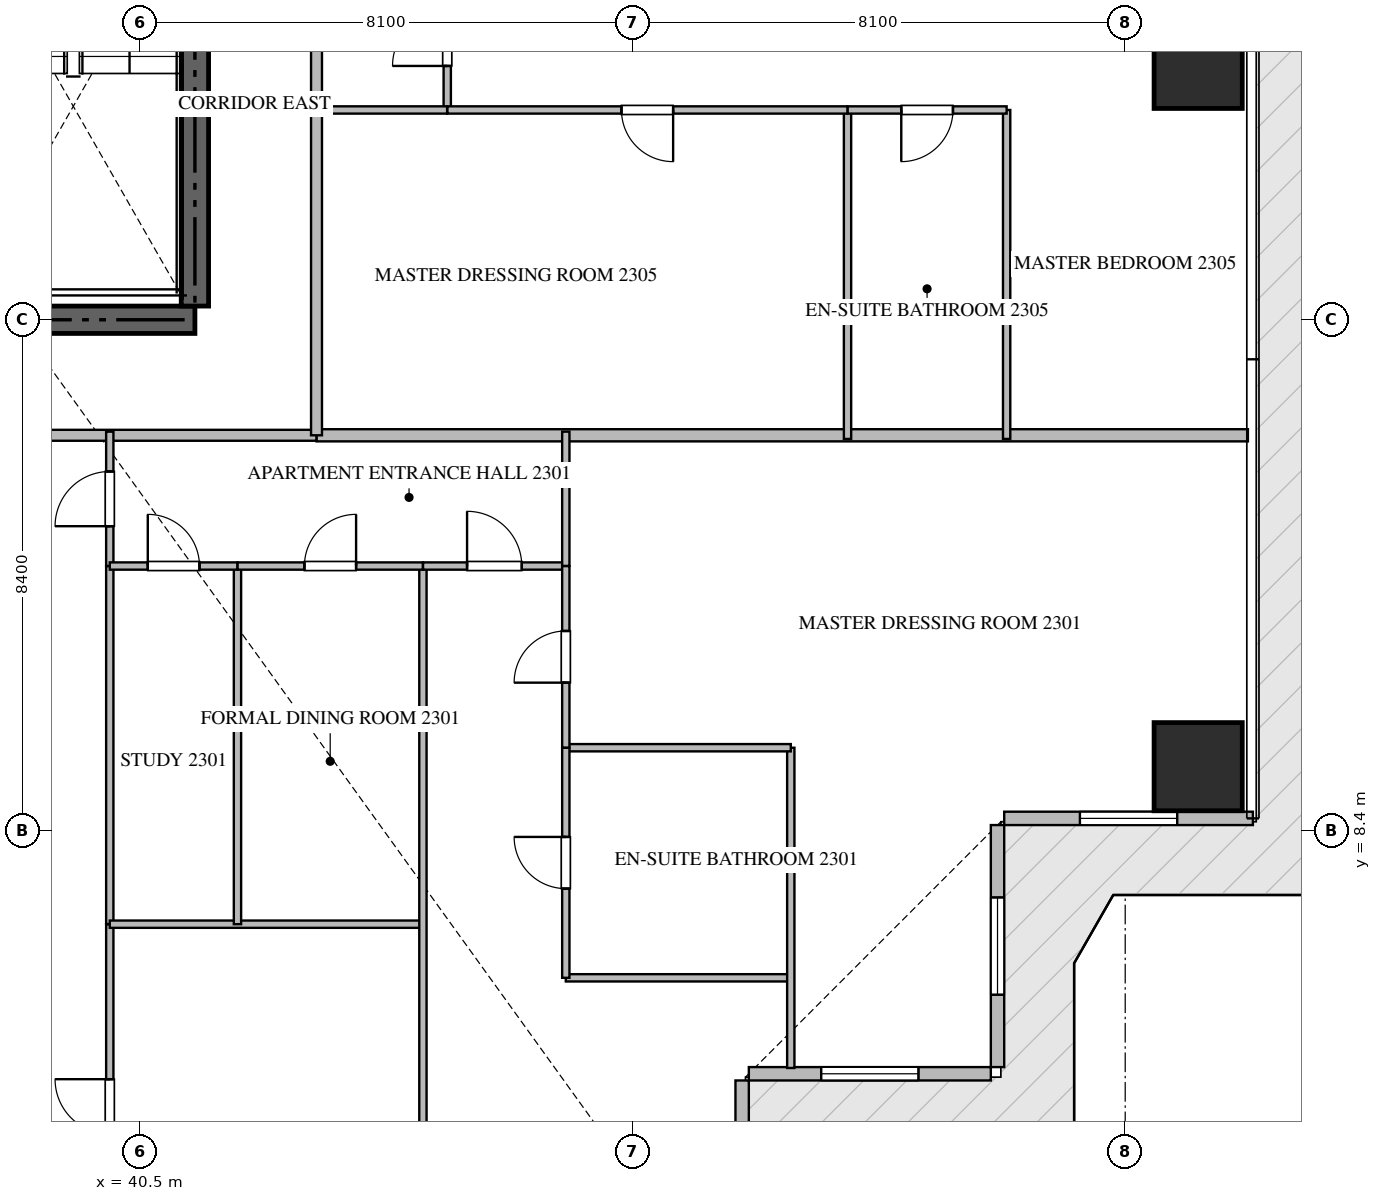
"""IFC4 building model, lengths in metres.
Left out: names, types, materials, properties, quantities, classifications, styles, units other than length and angle.
Written with IfcOpenShell. Run it as: python <this file> out.ifc"""

import sys

from ifc_helpers import new_model, si_unit, direction, frame, frame_2d, origin, origin_2d, place, context, subcontext, project, spatial, rectangle, extrude, source, transform, mapped, element, fill, save


model = new_model("IFC4")
c1 = context("Model", 3, precision=1e-05, world=origin(), true_north=direction((0.0, 1.0)))
c2 = subcontext(c1, "Body", "Model", "MODEL_VIEW")
j1 = project(units=[si_unit("LENGTHUNIT", "METRE"), si_unit("PLANEANGLEUNIT", "RADIAN")], contexts=[c1])
p1 = place(None, origin())
s1 = spatial("IfcSite", under=j1, at=p1, CompositionType="ELEMENT")
p2 = place(p1, origin())
s2 = spatial("IfcBuilding", under=s1, at=p2, CompositionType="ELEMENT")
p3 = place(p2, frame((0.0, 0.0, 94.2)))
s3 = spatial("IfcBuildingStorey", under=s2, at=p3, CompositionType="ELEMENT", Elevation=94.2)
p4 = place(p3, frame((23.4, 16.8, -0.26), z_axis=(0.0, 0.0, 1.0), x_axis=(1.0, 0.0, 0.0)))
e1 = element("IfcWall", 1, at=p4, inside=s3, PredefinedType="SHEAR", context=c2, shape_type="SweptSolid", body=[
    extrude(rectangle(XDim=18.0, YDim=0.45, at=frame_2d((9.0, 0.0))), origin(), (0.0, 0.0, 1.0), 3.748),
])
p5 = place(p3, frame((41.4, 17.025, -0.26), z_axis=(0.0, 0.0, 1.0), x_axis=(0.0, 1.0, 0.0)))
e2 = element("IfcWall", 2, at=p5, inside=s3, PredefinedType="SHEAR", context=c2, shape_type="SweptSolid", body=[
    extrude(rectangle(XDim=8.325, YDim=0.45, at=frame_2d((4.163, 0.0))), origin(), (0.0, 0.0, 1.0), 3.748),
])
m1 = source(origin(), c2, "Body", "SweptSolid", [
    extrude(rectangle(XDim=1.45, YDim=1.45, at=origin_2d()), origin(), (0.0, 0.0, 1.0), 3.75),
])
for number, where, z_axis, x_axis in (
    (3, (57.9, 9.45, -0.26), (0.0, 0.0, 1.0), (1.0, 0.0, 0.0)),
    (4, (57.9, 21.0, -0.26), (0.0, 0.0, 1.0), (1.0, 0.0, 0.0)),
):
    element("IfcColumn", number, at=place(p3, frame(where, z_axis=z_axis, x_axis=x_axis)), inside=s3, PredefinedType="COLUMN", context=c2, shape_type="MappedRepresentation", body=[
        mapped(m1, transform((0.0, 0.0, 0.0), scale=1.0)),
    ])
p6 = place(p3, frame((50.4, 0.2, 0.0), z_axis=(0.0, 0.0, 1.0), x_axis=(0.0, 1.0, 0.0)))
e5 = element("IfcWall", 5, at=p6, inside=s3, PredefinedType="ELEMENTEDWALL", context=c2, shape_type="SweptSolid", body=[
    extrude(rectangle(XDim=4.09, YDim=0.22, at=frame_2d((2.045, 0.0))), origin(), (0.0, 0.0, 1.0), 3.475),
])
p7 = place(p6, frame((1.245, 0.0, 0.65)))
e6 = element("IfcOpeningElement", 6, at=p7, cuts=e5, PredefinedType="OPENING", context=c2, shape_type="SweptSolid", body=[
    extrude(rectangle(XDim=1.6, YDim=2.1, at=frame_2d((0.8, 1.05))), frame((0.0, 0.12, 0.0), z_axis=(0.0, -1.0, 0.0), x_axis=(1.0, 0.0, 0.0)), (0.0, 0.0, 1.0), 0.24),
])
p8 = place(p3, frame((50.51, 4.4, 0.0), z_axis=(0.0, 0.0, 1.0), x_axis=(1.0, 0.0, 0.0)))
e7 = element("IfcWall", 7, at=p8, inside=s3, PredefinedType="ELEMENTEDWALL", context=c2, shape_type="SweptSolid", body=[
    extrude(rectangle(XDim=3.98, YDim=0.22, at=frame_2d((1.99, 0.0))), origin(), (0.0, 0.0, 1.0), 3.475),
])
p9 = place(p8, frame((1.19, 0.0, 0.65)))
e8 = element("IfcOpeningElement", 8, at=p9, cuts=e7, PredefinedType="OPENING", context=c2, shape_type="SweptSolid", body=[
    extrude(rectangle(XDim=1.6, YDim=2.1, at=frame_2d((0.8, 1.05))), frame((0.0, 0.12, 0.0), z_axis=(0.0, -1.0, 0.0), x_axis=(1.0, 0.0, 0.0)), (0.0, 0.0, 1.0), 0.24),
])
p10 = place(p3, frame((54.6, 4.51, 0.0), z_axis=(0.0, 0.0, 1.0), x_axis=(0.0, 1.0, 0.0)))
e9 = element("IfcWall", 9, at=p10, inside=s3, PredefinedType="ELEMENTEDWALL", context=c2, shape_type="SweptSolid", body=[
    extrude(rectangle(XDim=3.98, YDim=0.22, at=frame_2d((1.99, 0.0))), origin(), (0.0, 0.0, 1.0), 3.475),
])
p11 = place(p10, frame((1.19, 0.0, 0.65)))
e10 = element("IfcOpeningElement", 10, at=p11, cuts=e9, PredefinedType="OPENING", context=c2, shape_type="SweptSolid", body=[
    extrude(rectangle(XDim=1.6, YDim=2.1, at=frame_2d((0.8, 1.05))), frame((0.0, 0.12, 0.0), z_axis=(0.0, -1.0, 0.0), x_axis=(1.0, 0.0, 0.0)), (0.0, 0.0, 1.0), 0.24),
])
p12 = place(p3, frame((54.71, 8.6, 0.0), z_axis=(0.0, 0.0, 1.0), x_axis=(1.0, 0.0, 0.0)))
e11 = element("IfcWall", 11, at=p12, inside=s3, PredefinedType="ELEMENTEDWALL", context=c2, shape_type="SweptSolid", body=[
    extrude(rectangle(XDim=4.09, YDim=0.22, at=frame_2d((2.045, 0.0))), origin(), (0.0, 0.0, 1.0), 3.475),
])
p13 = place(p12, frame((1.245, 0.0, 0.65)))
e12 = element("IfcOpeningElement", 12, at=p13, cuts=e11, PredefinedType="OPENING", context=c2, shape_type="SweptSolid", body=[
    extrude(rectangle(XDim=1.6, YDim=2.1, at=frame_2d((0.8, 1.05))), frame((0.0, 0.12, 0.0), z_axis=(0.0, -1.0, 0.0), x_axis=(1.0, 0.0, 0.0)), (0.0, 0.0, 1.0), 0.24),
])
p14 = place(p3, frame((43.4, 14.9, 0.0), z_axis=(0.0, 0.0, 1.0), x_axis=(1.0, 0.0, 0.0)))
e13 = element("IfcWall", 13, at=p14, inside=s3, PredefinedType="PARTITIONING", context=c2, shape_type="SweptSolid", body=[
    extrude(rectangle(XDim=15.318, YDim=0.2, at=frame_2d((7.659, 0.0))), origin(), (0.0, 0.0, 1.0), 3.49),
])
p15 = place(p3, frame((21.402, 14.9, 0.0), z_axis=(0.0, 0.0, 1.0), x_axis=(1.0, 0.0, 0.0)))
e14 = element("IfcWall", 14, at=p15, inside=s3, PredefinedType="PARTITIONING", context=c2, shape_type="SweptSolid", body=[
    extrude(rectangle(XDim=21.996, YDim=0.18, at=frame_2d((10.998, 0.0))), origin(), (0.0, 0.0, 1.0), 3.49),
])
p16 = place(p15, frame((15.222, 0.0, 0.0)))
e15 = element("IfcOpeningElement", 15, at=p16, cuts=e14, PredefinedType="OPENING", context=c2, shape_type="SweptSolid", body=[
    extrude(rectangle(XDim=1.0, YDim=2.15, at=frame_2d((0.5, 1.075))), frame((0.0, 0.1, 0.0), z_axis=(0.0, -1.0, 0.0), x_axis=(1.0, 0.0, 0.0)), (0.0, 0.0, 1.0), 0.2),
])
p17 = place(p3, frame((43.4, 14.9, 0.0), z_axis=(0.0, 0.0, 1.0), x_axis=(0.0, 1.0, 0.0)))
e16 = element("IfcWall", 16, at=p17, inside=s3, PredefinedType="PARTITIONING", context=c2, shape_type="SweptSolid", body=[
    extrude(rectangle(XDim=20.6, YDim=0.18, at=frame_2d((10.3, 0.0))), origin(), (0.0, 0.0, 1.0), 3.49),
])
p18 = place(p17, frame((17.64, 0.0, 0.0)))
e17 = element("IfcOpeningElement", 17, at=p18, cuts=e16, PredefinedType="OPENING", context=c2, shape_type="SweptSolid", body=[
    extrude(rectangle(XDim=1.0, YDim=2.15, at=frame_2d((0.5, 1.075))), frame((0.0, 0.1, 0.0), z_axis=(0.0, -1.0, 0.0), x_axis=(1.0, 0.0, 0.0)), (0.0, 0.0, 1.0), 0.2),
])
p19 = place(p3, frame((40.0, 12.75, 0.0), z_axis=(0.0, 0.0, 1.0), x_axis=(0.0, 1.0, 0.0)))
e18 = element("IfcWall", 18, at=p19, inside=s3, PredefinedType="PARTITIONING", context=c2, shape_type="SweptSolid", body=[
    extrude(rectangle(XDim=2.21, YDim=0.12, at=frame_2d((1.105, 0.0))), origin(), (0.0, 0.0, 1.0), 3.49),
])
p20 = place(p19, frame((0.655, 0.0, 0.0)))
e19 = element("IfcOpeningElement", 19, at=p20, cuts=e18, PredefinedType="OPENING", context=c2, shape_type="SweptSolid", body=[
    extrude(rectangle(XDim=0.9, YDim=2.1, at=frame_2d((0.45, 1.05))), frame((0.0, 0.07, 0.0), z_axis=(0.0, -1.0, 0.0), x_axis=(1.0, 0.0, 0.0)), (0.0, 0.0, 1.0), 0.14),
])
p21 = place(p3, frame((40.0, 0.295, 0.0), z_axis=(0.0, 0.0, 1.0), x_axis=(0.0, 1.0, 0.0)))
e20 = element("IfcWall", 20, at=p21, inside=s3, PredefinedType="PARTITIONING", context=c2, shape_type="SweptSolid", body=[
    extrude(rectangle(XDim=6.565, YDim=0.12, at=frame_2d((3.283, 0.0))), origin(), (0.0, 0.0, 1.0), 3.49),
])
p22 = place(p21, frame((3.116, 0.0, 0.0)))
e21 = element("IfcOpeningElement", 21, at=p22, cuts=e20, PredefinedType="OPENING", context=c2, shape_type="SweptSolid", body=[
    extrude(rectangle(XDim=0.9, YDim=2.1, at=frame_2d((0.45, 1.05))), frame((0.0, 0.07, 0.0), z_axis=(0.0, -1.0, 0.0), x_axis=(1.0, 0.0, 0.0)), (0.0, 0.0, 1.0), 0.14),
])
p23 = place(p3, frame((40.0, 6.862, 0.0), z_axis=(0.0, 0.0, 1.0), x_axis=(0.0, 1.0, 0.0)))
e22 = element("IfcWall", 22, at=p23, inside=s3, PredefinedType="PARTITIONING", context=c2, shape_type="SweptSolid", body=[
    extrude(rectangle(XDim=5.886, YDim=0.12, at=frame_2d((2.943, 0.0))), origin(), (0.0, 0.0, 1.0), 3.49),
])
p24 = place(p3, frame((40.0, 6.86, 0.0), z_axis=(0.0, 0.0, 1.0), x_axis=(1.0, 0.0, 0.0)))
e23 = element("IfcWall", 23, at=p24, inside=s3, PredefinedType="PARTITIONING", context=c2, shape_type="SweptSolid", body=[
    extrude(rectangle(XDim=5.15, YDim=0.12, at=frame_2d((2.575, 0.0))), origin(), (0.0, 0.0, 1.0), 3.49),
])
p25 = place(p3, frame((45.15, 0.295, 0.0), z_axis=(0.0, 0.0, 1.0), x_axis=(0.0, 1.0, 0.0)))
e24 = element("IfcWall", 24, at=p25, inside=s3, PredefinedType="PARTITIONING", context=c2, shape_type="SweptSolid", body=[
    extrude(rectangle(XDim=12.455, YDim=0.12, at=frame_2d((6.228, 0.0))), origin(), (0.0, 0.0, 1.0), 3.49),
])
p26 = place(p3, frame((42.1, 6.86, 0.0), z_axis=(0.0, 0.0, 1.0), x_axis=(0.0, 1.0, 0.0)))
e25 = element("IfcWall", 25, at=p26, inside=s3, PredefinedType="PARTITIONING", context=c2, shape_type="SweptSolid", body=[
    extrude(rectangle(XDim=5.89, YDim=0.12, at=frame_2d((2.945, 0.0))), origin(), (0.0, 0.0, 1.0), 3.49),
])
p27 = place(p3, frame((40.0, 12.75, 0.0), z_axis=(0.0, 0.0, 1.0), x_axis=(1.0, 0.0, 0.0)))
e26 = element("IfcWall", 26, at=p27, inside=s3, PredefinedType="PARTITIONING", context=c2, shape_type="SweptSolid", body=[
    extrude(rectangle(XDim=2.1, YDim=0.12, at=frame_2d((1.05, 0.0))), origin(), (0.0, 0.0, 1.0), 3.49),
])
p28 = place(p27, frame((0.625, 0.0, 0.0)))
e27 = element("IfcOpeningElement", 27, at=p28, cuts=e26, PredefinedType="OPENING", context=c2, shape_type="SweptSolid", body=[
    extrude(rectangle(XDim=0.85, YDim=2.1, at=frame_2d((0.425, 1.05))), frame((0.0, 0.07, 0.0), z_axis=(0.0, -1.0, 0.0), x_axis=(1.0, 0.0, 0.0)), (0.0, 0.0, 1.0), 0.14),
])
p29 = place(p3, frame((42.102, 12.75, 0.0), z_axis=(0.0, 0.0, 1.0), x_axis=(1.0, 0.0, 0.0)))
e28 = element("IfcWall", 28, at=p29, inside=s3, PredefinedType="PARTITIONING", context=c2, shape_type="SweptSolid", body=[
    extrude(rectangle(XDim=3.048, YDim=0.12, at=frame_2d((1.524, 0.0))), origin(), (0.0, 0.0, 1.0), 3.49),
])
p30 = place(p29, frame((1.099, 0.0, 0.0)))
e29 = element("IfcOpeningElement", 29, at=p30, cuts=e28, PredefinedType="OPENING", context=c2, shape_type="SweptSolid", body=[
    extrude(rectangle(XDim=0.85, YDim=2.1, at=frame_2d((0.425, 1.05))), frame((0.0, 0.07, 0.0), z_axis=(0.0, -1.0, 0.0), x_axis=(1.0, 0.0, 0.0)), (0.0, 0.0, 1.0), 0.14),
])
p31 = place(p3, frame((45.152, 12.75, 0.0), z_axis=(0.0, 0.0, 1.0), x_axis=(1.0, 0.0, 0.0)))
e30 = element("IfcWall", 30, at=p31, inside=s3, PredefinedType="PARTITIONING", context=c2, shape_type="SweptSolid", body=[
    extrude(rectangle(XDim=2.348, YDim=0.12, at=frame_2d((1.174, 0.0))), origin(), (0.0, 0.0, 1.0), 3.49),
])
p32 = place(p31, frame((0.724, 0.0, 0.0)))
e31 = element("IfcOpeningElement", 31, at=p32, cuts=e30, PredefinedType="OPENING", context=c2, shape_type="SweptSolid", body=[
    extrude(rectangle(XDim=0.9, YDim=2.1, at=frame_2d((0.45, 1.05))), frame((0.0, 0.07, 0.0), z_axis=(0.0, -1.0, 0.0), x_axis=(1.0, 0.0, 0.0)), (0.0, 0.0, 1.0), 0.14),
])
p33 = place(p3, frame((47.5, 5.978, 0.0), z_axis=(0.0, 0.0, 1.0), x_axis=(1.0, 0.0, 0.0)))
e32 = element("IfcWall", 32, at=p33, inside=s3, PredefinedType="PARTITIONING", context=c2, shape_type="SweptSolid", body=[
    extrude(rectangle(XDim=3.7, YDim=0.12, at=frame_2d((1.85, 0.0))), origin(), (0.0, 0.0, 1.0), 3.49),
])
p34 = place(p3, frame((51.2, 4.495, 0.0), z_axis=(0.0, 0.0, 1.0), x_axis=(0.0, 1.0, 0.0)))
e33 = element("IfcWall", 33, at=p34, inside=s3, PredefinedType="PARTITIONING", context=c2, shape_type="SweptSolid", body=[
    extrude(rectangle(XDim=5.267, YDim=0.12, at=frame_2d((2.633, 0.0))), origin(), (0.0, 0.0, 1.0), 3.49),
])
p35 = place(p3, frame((47.5, 9.762, 0.0), z_axis=(0.0, 0.0, 1.0), x_axis=(1.0, 0.0, 0.0)))
e34 = element("IfcWall", 34, at=p35, inside=s3, PredefinedType="PARTITIONING", context=c2, shape_type="SweptSolid", body=[
    extrude(rectangle(XDim=3.7, YDim=0.12, at=frame_2d((1.85, 0.0))), origin(), (0.0, 0.0, 1.0), 3.49),
])
p36 = place(p3, frame((47.5, 5.978, 0.0), z_axis=(0.0, 0.0, 1.0), x_axis=(0.0, 1.0, 0.0)))
e35 = element("IfcWall", 35, at=p36, inside=s3, PredefinedType="PARTITIONING", context=c2, shape_type="SweptSolid", body=[
    extrude(rectangle(XDim=3.784, YDim=0.12, at=frame_2d((1.892, 0.0))), origin(), (0.0, 0.0, 1.0), 3.49),
])
p37 = place(p36, frame((1.467, 0.0, 0.0)))
e36 = element("IfcOpeningElement", 36, at=p37, cuts=e35, PredefinedType="OPENING", context=c2, shape_type="SweptSolid", body=[
    extrude(rectangle(XDim=0.85, YDim=2.1, at=frame_2d((0.425, 1.05))), frame((0.0, 0.07, 0.0), z_axis=(0.0, -1.0, 0.0), x_axis=(1.0, 0.0, 0.0)), (0.0, 0.0, 1.0), 0.14),
])
p38 = place(p3, frame((47.5, 9.764, 0.0), z_axis=(0.0, 0.0, 1.0), x_axis=(0.0, 1.0, 0.0)))
e37 = element("IfcWall", 37, at=p38, inside=s3, PredefinedType="PARTITIONING", context=c2, shape_type="SweptSolid", body=[
    extrude(rectangle(XDim=2.986, YDim=0.12, at=frame_2d((1.493, 0.0))), origin(), (0.0, 0.0, 1.0), 3.49),
])
p39 = place(p38, frame((1.068, 0.0, 0.0)))
e38 = element("IfcOpeningElement", 38, at=p39, cuts=e37, PredefinedType="OPENING", context=c2, shape_type="SweptSolid", body=[
    extrude(rectangle(XDim=0.85, YDim=2.1, at=frame_2d((0.425, 1.05))), frame((0.0, 0.07, 0.0), z_axis=(0.0, -1.0, 0.0), x_axis=(1.0, 0.0, 0.0)), (0.0, 0.0, 1.0), 0.14),
])
p40 = place(p3, frame((47.5, 12.752, 0.0), z_axis=(0.0, 0.0, 1.0), x_axis=(0.0, 1.0, 0.0)))
e39 = element("IfcWall", 39, at=p40, inside=s3, PredefinedType="PARTITIONING", context=c2, shape_type="SweptSolid", body=[
    extrude(rectangle(XDim=2.208, YDim=0.12, at=frame_2d((1.104, 0.0))), origin(), (0.0, 0.0, 1.0), 3.49),
])
p41 = place(p3, frame((45.55, 20.25, 0.0), z_axis=(0.0, 0.0, 1.0), x_axis=(0.0, 1.0, 0.0)))
e40 = element("IfcWall", 40, at=p41, inside=s3, PredefinedType="PARTITIONING", context=c2, shape_type="SweptSolid", body=[
    extrude(rectangle(XDim=2.348, YDim=0.12, at=frame_2d((1.174, 0.0))), origin(), (0.0, 0.0, 1.0), 3.49),
])
p42 = place(p41, frame((0.724, 0.0, 0.0)))
e41 = element("IfcOpeningElement", 41, at=p42, cuts=e40, PredefinedType="OPENING", context=c2, shape_type="SweptSolid", body=[
    extrude(rectangle(XDim=0.9, YDim=2.1, at=frame_2d((0.45, 1.05))), frame((0.0, 0.07, 0.0), z_axis=(0.0, -1.0, 0.0), x_axis=(1.0, 0.0, 0.0)), (0.0, 0.0, 1.0), 0.14),
])
for number, where, z_axis, x_axis in (
    (42, (54.75, 14.84, 0.0), (0.0, 0.0, 1.0), (0.0, 1.0, 0.0)),
    (43, (52.133, 14.84, 0.0), (0.0, 0.0, 1.0), (0.0, 1.0, 0.0)),
):
    element("IfcWall", number, at=place(p3, frame(where, z_axis=z_axis, x_axis=x_axis)), inside=s3, PredefinedType="PARTITIONING", context=c2, shape_type="SweptSolid", body=[
        extrude(rectangle(XDim=5.41, YDim=0.12, at=frame_2d((2.705, 0.0))), origin(), (0.0, 0.0, 1.0), 3.49),
    ])
p43 = place(p3, frame((54.75, 20.25, 0.0), z_axis=(0.0, 0.0, 1.0), x_axis=(-1.0, 0.0, 0.0)))
e44 = element("IfcWall", 44, at=p43, inside=s3, PredefinedType="PARTITIONING", context=c2, shape_type="SweptSolid", body=[
    extrude(rectangle(XDim=2.617, YDim=0.12, at=frame_2d((1.309, 0.0))), origin(), (0.0, 0.0, 1.0), 3.49),
])
p44 = place(p43, frame((0.883, 0.0, 0.0)))
e45 = element("IfcOpeningElement", 45, at=p44, cuts=e44, PredefinedType="OPENING", context=c2, shape_type="SweptSolid", body=[
    extrude(rectangle(XDim=0.85, YDim=2.1, at=frame_2d((0.425, 1.05))), frame((0.0, 0.07, 0.0), z_axis=(0.0, -1.0, 0.0), x_axis=(1.0, 0.0, 0.0)), (0.0, 0.0, 1.0), 0.14),
])
p45 = place(p3, frame((52.131, 20.25, 0.0), z_axis=(0.0, 0.0, 1.0), x_axis=(-1.0, 0.0, 0.0)))
e46 = element("IfcWall", 46, at=p45, inside=s3, PredefinedType="PARTITIONING", context=c2, shape_type="SweptSolid", body=[
    extrude(rectangle(XDim=6.581, YDim=0.12, at=frame_2d((3.291, 0.0))), origin(), (0.0, 0.0, 1.0), 3.49),
])
p46 = place(p45, frame((2.866, 0.0, 0.0)))
e47 = element("IfcOpeningElement", 47, at=p46, cuts=e46, PredefinedType="OPENING", context=c2, shape_type="SweptSolid", body=[
    extrude(rectangle(XDim=0.85, YDim=2.1, at=frame_2d((0.425, 1.05))), frame((0.0, 0.07, 0.0), z_axis=(0.0, -1.0, 0.0), x_axis=(1.0, 0.0, 0.0)), (0.0, 0.0, 1.0), 0.14),
])
p47 = place(p3, frame((45.548, 20.25, 0.0), z_axis=(0.0, 0.0, 1.0), x_axis=(-1.0, 0.0, 0.0)))
e48 = element("IfcWall", 48, at=p47, inside=s3, PredefinedType="PARTITIONING", context=c2, shape_type="SweptSolid", body=[
    extrude(rectangle(XDim=2.208, YDim=0.12, at=frame_2d((1.104, 0.0))), origin(), (0.0, 0.0, 1.0), 3.49),
])
m2 = source(origin(), c2, "Body", "SweptSolid", [
    extrude(rectangle(XDim=1.6, YDim=2.1, at=frame_2d((0.8, 1.05))), frame((0.0, 0.03, 0.0), z_axis=(0.0, -1.0, 0.0), x_axis=(1.0, 0.0, 0.0)), (0.0, 0.0, 1.0), 0.06),
])
p48 = place(p9, origin())
e49 = element("IfcWindow", 49, at=p48, inside=s3, PartitioningType="SINGLE_PANEL", PredefinedType="WINDOW", context=c2, shape_type="MappedRepresentation", body=[
    mapped(m2, transform((0.0, 0.0, 0.0), scale=1.0)),
])
fill(e8, e49)
p49 = place(p11, origin())
e50 = element("IfcWindow", 50, at=p49, inside=s3, PartitioningType="SINGLE_PANEL", PredefinedType="WINDOW", context=c2, shape_type="MappedRepresentation", body=[
    mapped(m2, transform((0.0, 0.0, 0.0), scale=1.0)),
])
fill(e10, e50)
p50 = place(p13, origin())
e51 = element("IfcWindow", 51, at=p50, inside=s3, PartitioningType="SINGLE_PANEL", PredefinedType="WINDOW", context=c2, shape_type="MappedRepresentation", body=[
    mapped(m2, transform((0.0, 0.0, 0.0), scale=1.0)),
])
fill(e12, e51)
m3 = source(origin(), c2, "Body", "SweptSolid", [
    extrude(rectangle(XDim=0.9, YDim=2.1, at=frame_2d((0.45, 1.05))), frame((0.0, 0.025, 0.0), z_axis=(0.0, -1.0, 0.0), x_axis=(1.0, 0.0, 0.0)), (0.0, 0.0, 1.0), 0.05),
])
p51 = place(p20, origin())
e52 = element("IfcDoor", 52, at=p51, inside=s3, OperationType="SINGLE_SWING_LEFT", PredefinedType="DOOR", context=c2, shape_type="MappedRepresentation", body=[
    mapped(m3, transform((0.0, 0.0, 0.0), scale=1.0)),
])
fill(e19, e52)
p52 = place(p22, origin())
e53 = element("IfcDoor", 53, at=p52, inside=s3, OperationType="SINGLE_SWING_RIGHT", PredefinedType="DOOR", context=c2, shape_type="MappedRepresentation", body=[
    mapped(m3, transform((0.0, 0.0, 0.0), scale=1.0)),
])
fill(e21, e53)
m4 = source(origin(), c2, "Body", "SweptSolid", [
    extrude(rectangle(XDim=0.85, YDim=2.1, at=frame_2d((0.425, 1.05))), frame((0.0, 0.025, 0.0), z_axis=(0.0, -1.0, 0.0), x_axis=(1.0, 0.0, 0.0)), (0.0, 0.0, 1.0), 0.05),
])
p53 = place(p28, origin())
e54 = element("IfcDoor", 54, at=p53, inside=s3, OperationType="SINGLE_SWING_LEFT", PredefinedType="DOOR", context=c2, shape_type="MappedRepresentation", body=[
    mapped(m4, transform((0.0, 0.0, 0.0), scale=1.0)),
])
fill(e27, e54)
p54 = place(p30, origin())
e55 = element("IfcDoor", 55, at=p54, inside=s3, OperationType="SINGLE_SWING_RIGHT", PredefinedType="DOOR", context=c2, shape_type="MappedRepresentation", body=[
    mapped(m4, transform((0.0, 0.0, 0.0), scale=1.0)),
])
fill(e29, e55)
p55 = place(p32, origin())
e56 = element("IfcDoor", 56, at=p55, inside=s3, OperationType="SINGLE_SWING_LEFT", PredefinedType="DOOR", context=c2, shape_type="MappedRepresentation", body=[
    mapped(m3, transform((0.0, 0.0, 0.0), scale=1.0)),
])
fill(e31, e56)
p56 = place(p37, origin())
e57 = element("IfcDoor", 57, at=p56, inside=s3, OperationType="SINGLE_SWING_RIGHT", PredefinedType="DOOR", context=c2, shape_type="MappedRepresentation", body=[
    mapped(m4, transform((0.0, 0.0, 0.0), scale=1.0)),
])
fill(e36, e57)
p57 = place(p39, origin())
e58 = element("IfcDoor", 58, at=p57, inside=s3, OperationType="SINGLE_SWING_LEFT", PredefinedType="DOOR", context=c2, shape_type="MappedRepresentation", body=[
    mapped(m4, transform((0.0, 0.0, 0.0), scale=1.0)),
])
fill(e38, e58)
p58 = place(p42, origin())
e59 = element("IfcDoor", 59, at=p58, inside=s3, OperationType="SINGLE_SWING_LEFT", PredefinedType="DOOR", context=c2, shape_type="MappedRepresentation", body=[
    mapped(m3, transform((0.0, 0.0, 0.0), scale=1.0)),
])
fill(e41, e59)
p59 = place(p44, origin())
e60 = element("IfcDoor", 60, at=p59, inside=s3, OperationType="SINGLE_SWING_RIGHT", PredefinedType="DOOR", context=c2, shape_type="MappedRepresentation", body=[
    mapped(m4, transform((0.0, 0.0, 0.0), scale=1.0)),
])
fill(e45, e60)
p60 = place(p46, origin())
e61 = element("IfcDoor", 61, at=p60, inside=s3, OperationType="SINGLE_SWING_LEFT", PredefinedType="DOOR", context=c2, shape_type="MappedRepresentation", body=[
    mapped(m4, transform((0.0, 0.0, 0.0), scale=1.0)),
])
fill(e47, e61)
save(model, sys.argv[1])
